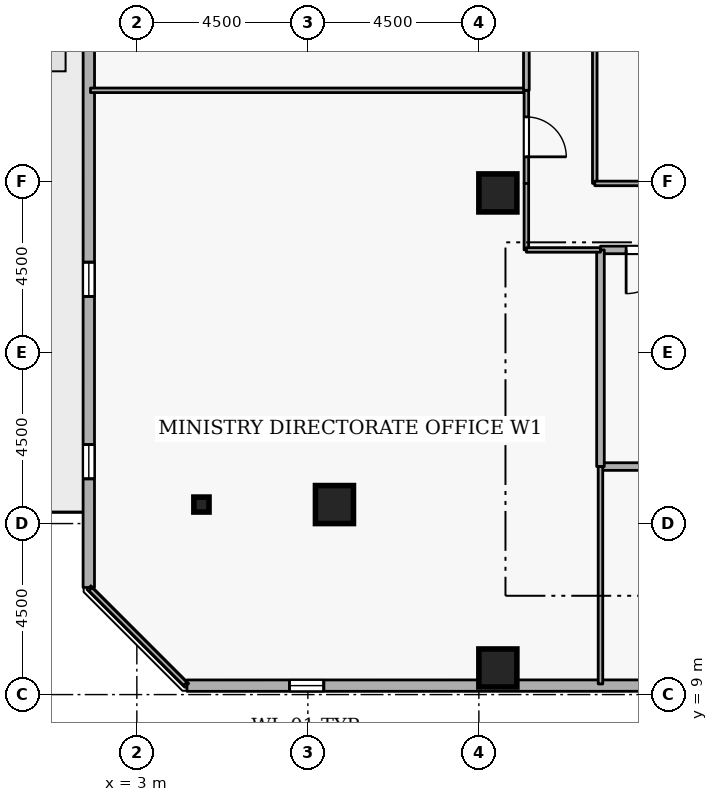
"""IFC4 building model, lengths in metres.
Left out: names, types, materials, properties, quantities, classifications, styles, units other than length and angle.
Written with IfcOpenShell. Run it as: python <this file> out.ifc"""

import sys

from ifc_helpers import new_model, si_unit, direction, frame, frame_2d, origin, origin_2d, place, context, subcontext, project, spatial, rectangle, i_section, extrude, element, fill, save


model = new_model("IFC4")
c1 = context("Model", 3, precision=1e-05, world=origin(), true_north=direction((0.0, 1.0)))
c2 = subcontext(c1, "Body", "Model", "MODEL_VIEW")
j1 = project(units=[si_unit("LENGTHUNIT", "METRE"), si_unit("PLANEANGLEUNIT", "RADIAN")], contexts=[c1])
p1 = place(None, origin())
s1 = spatial("IfcSite", under=j1, at=p1, CompositionType="ELEMENT")
p2 = place(p1, origin())
s2 = spatial("IfcBuilding", under=s1, at=p2, CompositionType="ELEMENT")
p3 = place(p2, frame((0.0, 0.0, 207.3)))
s3 = spatial("IfcBuildingStorey", under=s2, at=p3, CompositionType="ELEMENT", Elevation=207.3)
for number, where, z_axis, x_axis in (
    (1, (12.5, 9.7, 0.0), (0.0, 0.0, 1.0), (1.0, 0.0, 0.0)),
    (2, (8.2, 14.0, 0.0), (0.0, 0.0, 1.0), (1.0, 0.0, 0.0)),
    (3, (12.5, 22.2, 0.0), (0.0, 0.0, 1.0), (1.0, 0.0, 0.0)),
):
    element("IfcColumn", number, at=place(p3, frame(where, z_axis=z_axis, x_axis=x_axis)), inside=s3, PredefinedType="COLUMN", context=c2, shape_type="SweptSolid", body=[
        extrude(rectangle(XDim=1.0, YDim=1.0, at=origin_2d()), origin(), (0.0, 0.0, 1.0), 3.6),
    ])
p4 = place(p3, frame((4.7, 14.0, 0.0), z_axis=(0.0, 0.0, 1.0), x_axis=(1.0, 0.0, 0.0)))
e4 = element("IfcColumn", 4, at=p4, inside=s3, PredefinedType="COLUMN", context=c2, shape_type="SweptSolid", body=[
    extrude(i_section(OverallWidth=0.399, OverallDepth=0.394, WebThickness=0.023, FlangeThickness=0.037, FilletRadius=0.015, at=origin_2d()), origin(), (0.0, 0.0, 1.0), 3.6),
])
p5 = place(p3, frame((4.319, 9.235, 0.0), z_axis=(0.0, 0.0, 1.0), x_axis=(0.999999994606, 0.000103863011, 0.0)))
e5 = element("IfcWall", 5, at=p5, inside=s3, PredefinedType="STANDARD", context=c2, shape_type="SweptSolid", body=[
    extrude(rectangle(XDim=35.259, YDim=0.3, at=frame_2d((17.629, 0.0))), origin(), (0.0, 0.0, 1.0), 2.7),
])
p6 = place(p5, frame((2.7, 0.0, 0.72)))
e6 = element("IfcOpeningElement", 6, at=p6, cuts=e5, PredefinedType="OPENING", context=c2, shape_type="SweptSolid", body=[
    extrude(rectangle(XDim=0.9, YDim=1.75, at=frame_2d((0.45, 0.875))), frame((0.0, 0.16, 0.0), z_axis=(0.0, -1.0, 0.0), x_axis=(1.0, 0.0, 0.0)), (0.0, 0.0, 1.0), 0.32),
])
p7 = place(p5, frame((12.3, 0.0, 0.72)))
e7 = element("IfcOpeningElement", 7, at=p7, cuts=e5, PredefinedType="OPENING", context=c2, shape_type="SweptSolid", body=[
    extrude(rectangle(XDim=0.9, YDim=1.75, at=frame_2d((0.45, 0.875))), frame((0.0, 0.16, 0.0), z_axis=(0.0, -1.0, 0.0), x_axis=(1.0, 0.0, 0.0)), (0.0, 0.0, 1.0), 0.32),
])
p8 = place(p5, frame((17.1, 0.0, 0.72)))
e8 = element("IfcOpeningElement", 8, at=p8, cuts=e5, PredefinedType="OPENING", context=c2, shape_type="SweptSolid", body=[
    extrude(rectangle(XDim=0.9, YDim=1.75, at=frame_2d((0.45, 0.875))), frame((0.0, 0.16, 0.0), z_axis=(0.0, -1.0, 0.0), x_axis=(1.0, 0.0, 0.0)), (0.0, 0.0, 1.0), 0.32),
])
p9 = place(p5, frame((26.7, 0.0, 0.72)))
e9 = element("IfcOpeningElement", 9, at=p9, cuts=e5, PredefinedType="OPENING", context=c2, shape_type="SweptSolid", body=[
    extrude(rectangle(XDim=0.9, YDim=1.75, at=frame_2d((0.45, 0.875))), frame((0.0, 0.16, 0.0), z_axis=(0.0, -1.0, 0.0), x_axis=(1.0, 0.0, 0.0)), (0.0, 0.0, 1.0), 0.32),
])
p10 = place(p3, frame((1.739, 47.078, 0.0), z_axis=(0.0, 0.0, 1.0), x_axis=(-0.000103863011, -0.999999994606, 0.0)))
e10 = element("IfcWall", 10, at=p10, inside=s3, PredefinedType="STANDARD", context=c2, shape_type="SweptSolid", body=[
    extrude(rectangle(XDim=35.259, YDim=0.3, at=frame_2d((17.629, 0.0))), origin(), (0.0, 0.0, 1.0), 2.7),
])
p11 = place(p10, frame((19.43, 0.0, 0.0)))
e11 = element("IfcOpeningElement", 11, at=p11, cuts=e10, PredefinedType="OPENING", context=c2, shape_type="SweptSolid", body=[
    extrude(rectangle(XDim=1.0, YDim=2.08, at=frame_2d((0.5, 1.04))), frame((0.0, 0.16, 0.0), z_axis=(0.0, -1.0, 0.0), x_axis=(1.0, 0.0, 0.0)), (0.0, 0.0, 1.0), 0.32),
])
p12 = place(p10, frame((2.7, 0.0, 0.72)))
e12 = element("IfcOpeningElement", 12, at=p12, cuts=e10, PredefinedType="OPENING", context=c2, shape_type="SweptSolid", body=[
    extrude(rectangle(XDim=0.9, YDim=1.75, at=frame_2d((0.45, 0.875))), frame((0.0, 0.16, 0.0), z_axis=(0.0, -1.0, 0.0), x_axis=(1.0, 0.0, 0.0)), (0.0, 0.0, 1.0), 0.32),
])
p13 = place(p10, frame((7.5, 0.0, 0.72)))
e13 = element("IfcOpeningElement", 13, at=p13, cuts=e10, PredefinedType="OPENING", context=c2, shape_type="SweptSolid", body=[
    extrude(rectangle(XDim=0.9, YDim=1.75, at=frame_2d((0.45, 0.875))), frame((0.0, 0.16, 0.0), z_axis=(0.0, -1.0, 0.0), x_axis=(1.0, 0.0, 0.0)), (0.0, 0.0, 1.0), 0.32),
])
p14 = place(p10, frame((12.3, 0.0, 0.72)))
e14 = element("IfcOpeningElement", 14, at=p14, cuts=e10, PredefinedType="OPENING", context=c2, shape_type="SweptSolid", body=[
    extrude(rectangle(XDim=0.9, YDim=1.75, at=frame_2d((0.45, 0.875))), frame((0.0, 0.16, 0.0), z_axis=(0.0, -1.0, 0.0), x_axis=(1.0, 0.0, 0.0)), (0.0, 0.0, 1.0), 0.32),
])
p15 = place(p10, frame((26.7, 0.0, 0.72)))
e15 = element("IfcOpeningElement", 15, at=p15, cuts=e10, PredefinedType="OPENING", context=c2, shape_type="SweptSolid", body=[
    extrude(rectangle(XDim=0.9, YDim=1.75, at=frame_2d((0.45, 0.875))), frame((0.0, 0.16, 0.0), z_axis=(0.0, -1.0, 0.0), x_axis=(1.0, 0.0, 0.0)), (0.0, 0.0, 1.0), 0.32),
])
p16 = place(p10, frame((31.5, 0.0, 0.72)))
e16 = element("IfcOpeningElement", 16, at=p16, cuts=e10, PredefinedType="OPENING", context=c2, shape_type="SweptSolid", body=[
    extrude(rectangle(XDim=0.9, YDim=1.75, at=frame_2d((0.45, 0.875))), frame((0.0, 0.16, 0.0), z_axis=(0.0, -1.0, 0.0), x_axis=(1.0, 0.0, 0.0)), (0.0, 0.0, 1.0), 0.32),
])
p17 = place(p3, frame((15.2, 15.0, 0.0), z_axis=(0.0, 0.0, 1.0), x_axis=(1.0, 0.0, 0.0)))
e17 = element("IfcWall", 17, at=p17, inside=s3, PredefinedType="STANDARD", context=c2, shape_type="SweptSolid", body=[
    extrude(rectangle(XDim=2.5, YDim=0.2, at=frame_2d((1.25, 0.0))), origin(), (0.0, 0.0, 1.0), 3.34),
])
p18 = place(p3, frame((17.7, 20.7, 0.0), z_axis=(0.0, 0.0, 1.0), x_axis=(-1.0, 0.0, 0.0)))
e18 = element("IfcWall", 18, at=p18, inside=s3, PredefinedType="STANDARD", context=c2, shape_type="SweptSolid", body=[
    extrude(rectangle(XDim=2.5, YDim=0.2, at=frame_2d((1.25, 0.0))), origin(), (0.0, 0.0, 1.0), 3.34),
])
p19 = place(p18, frame((0.675, 0.0, 0.0)))
e19 = element("IfcOpeningElement", 19, at=p19, cuts=e18, PredefinedType="OPENING", context=c2, shape_type="SweptSolid", body=[
    extrude(rectangle(XDim=1.15, YDim=2.1, at=frame_2d((0.575, 1.05))), frame((0.0, 0.11, 0.0), z_axis=(0.0, -1.0, 0.0), x_axis=(1.0, 0.0, 0.0)), (0.0, 0.0, 1.0), 0.22),
])
p20 = place(p3, frame((15.2, 20.7, 0.0), z_axis=(0.0, 0.0, 1.0), x_axis=(0.0, -1.0, 0.0)))
e20 = element("IfcWall", 20, at=p20, inside=s3, PredefinedType="STANDARD", context=c2, shape_type="SweptSolid", body=[
    extrude(rectangle(XDim=5.7, YDim=0.2, at=frame_2d((2.85, 0.0))), origin(), (0.0, 0.0, 1.0), 3.34),
])
p21 = place(p3, frame((1.78, 24.9, 0.0), z_axis=(0.0, 0.0, 1.0), x_axis=(1.0, 0.0, 0.0)))
e21 = element("IfcWall", 21, at=p21, inside=s3, PredefinedType="PARTITIONING", context=c2, shape_type="SweptSolid", body=[
    extrude(rectangle(XDim=11.47, YDim=0.12, at=frame_2d((5.735, 0.0))), origin(), (0.0, 0.0, 1.0), 3.34),
])
p22 = place(p3, frame((13.25, 24.9, 0.0), z_axis=(0.0, 0.0, 1.0), x_axis=(0.0, -1.0, 0.0)))
e22 = element("IfcWall", 22, at=p22, inside=s3, PredefinedType="PARTITIONING", context=c2, shape_type="SweptSolid", body=[
    extrude(rectangle(XDim=2.45, YDim=0.12, at=frame_2d((1.225, 0.0))), origin(), (0.0, 0.0, 1.0), 3.34),
])
p23 = place(p22, frame((0.7, 0.0, 0.0)))
e23 = element("IfcOpeningElement", 23, at=p23, cuts=e22, PredefinedType="OPENING", context=c2, shape_type="SweptSolid", body=[
    extrude(rectangle(XDim=1.05, YDim=2.1, at=frame_2d((0.525, 1.05))), frame((0.0, 0.07, 0.0), z_axis=(0.0, -1.0, 0.0), x_axis=(1.0, 0.0, 0.0)), (0.0, 0.0, 1.0), 0.14),
])
p24 = place(p3, frame((13.25, 22.45, 0.0), z_axis=(0.0, 0.0, 1.0), x_axis=(0.0, -1.0, 0.0)))
e24 = element("IfcWall", 24, at=p24, inside=s3, PredefinedType="PARTITIONING", context=c2, shape_type="SweptSolid", body=[
    extrude(rectangle(XDim=1.75, YDim=0.12, at=frame_2d((0.875, 0.0))), origin(), (0.0, 0.0, 1.0), 3.34),
])
p25 = place(p3, frame((13.25, 20.7, 0.0), z_axis=(0.0, 0.0, 1.0), x_axis=(1.0, 0.0, 0.0)))
e25 = element("IfcWall", 25, at=p25, inside=s3, PredefinedType="PARTITIONING", context=c2, shape_type="SweptSolid", body=[
    extrude(rectangle(XDim=1.95, YDim=0.12, at=frame_2d((0.975, 0.0))), origin(), (0.0, 0.0, 1.0), 3.34),
])
p26 = place(p3, frame((15.2, 15.0, 0.0), z_axis=(0.0, 0.0, 1.0), x_axis=(0.0, -1.0, 0.0)))
e26 = element("IfcWall", 26, at=p26, inside=s3, PredefinedType="PARTITIONING", context=c2, shape_type="SweptSolid", body=[
    extrude(rectangle(XDim=5.72, YDim=0.12, at=frame_2d((2.86, 0.0))), origin(), (0.0, 0.0, 1.0), 3.34),
])
p27 = place(p3, frame((4.275, 9.28, 0.0), z_axis=(0.0, 0.0, 1.0), x_axis=(-0.707106781187, 0.707106781187, 0.0)))
e27 = element("IfcWall", 27, at=p27, inside=s3, PredefinedType="PARTITIONING", context=c2, shape_type="SweptSolid", body=[
    extrude(rectangle(XDim=3.528, YDim=0.12, at=frame_2d((1.764, 0.0))), origin(), (0.0, 0.0, 1.0), 3.34),
])
p28 = place(p3, frame((13.25, 29.1, 0.0), z_axis=(0.0, 0.0, 1.0), x_axis=(0.0, -1.0, 0.0)))
e28 = element("IfcWall", 28, at=p28, inside=s3, PredefinedType="PARTITIONING", context=c2, shape_type="SweptSolid", body=[
    extrude(rectangle(XDim=4.2, YDim=0.15, at=frame_2d((2.1, 0.0))), origin(), (0.0, 0.0, 1.0), 3.34),
])
p29 = place(p28, frame((1.45, 0.0, 0.0)))
e29 = element("IfcOpeningElement", 29, at=p29, cuts=e28, PredefinedType="OPENING", context=c2, shape_type="SweptSolid", body=[
    extrude(rectangle(XDim=1.3, YDim=2.12, at=frame_2d((0.65, 1.06))), frame((0.0, 0.085, 0.0), z_axis=(0.0, -1.0, 0.0), x_axis=(1.0, 0.0, 0.0)), (0.0, 0.0, 1.0), 0.17),
])
p30 = place(p3, frame((15.05, 22.45, 0.0), z_axis=(0.0, 0.0, 1.0), x_axis=(0.0, 1.0, 0.0)))
e30 = element("IfcWall", 30, at=p30, inside=s3, PredefinedType="PARTITIONING", context=c2, shape_type="SweptSolid", body=[
    extrude(rectangle(XDim=9.1, YDim=0.12, at=frame_2d((4.55, 0.0))), origin(), (0.0, 0.0, 1.0), 3.34),
])
p31 = place(p30, frame((4.075, 0.0, 0.0)))
e31 = element("IfcOpeningElement", 31, at=p31, cuts=e30, PredefinedType="OPENING", context=c2, shape_type="SweptSolid", body=[
    extrude(rectangle(XDim=0.95, YDim=2.1, at=frame_2d((0.475, 1.05))), frame((0.0, 0.07, 0.0), z_axis=(0.0, -1.0, 0.0), x_axis=(1.0, 0.0, 0.0)), (0.0, 0.0, 1.0), 0.14),
])
p32 = place(p3, frame((20.9, 22.45, 0.0), z_axis=(0.0, 0.0, 1.0), x_axis=(-1.0, 0.0, 0.0)))
e32 = element("IfcWall", 32, at=p32, inside=s3, PredefinedType="PARTITIONING", context=c2, shape_type="SweptSolid", body=[
    extrude(rectangle(XDim=5.85, YDim=0.12, at=frame_2d((2.925, 0.0))), origin(), (0.0, 0.0, 1.0), 3.34),
])
p33 = place(p6, origin())
e33 = element("IfcWindow", 33, at=p33, inside=s3, PartitioningType="SINGLE_PANEL", PredefinedType="WINDOW", context=c2, shape_type="SweptSolid", body=[
    extrude(rectangle(XDim=0.9, YDim=1.75, at=frame_2d((0.45, 0.875))), frame((0.0, 0.03, 0.0), z_axis=(0.0, -1.0, 0.0), x_axis=(1.0, 0.0, 0.0)), (0.0, 0.0, 1.0), 0.06),
])
fill(e6, e33)
p34 = place(p15, origin())
e34 = element("IfcWindow", 34, at=p34, inside=s3, PartitioningType="SINGLE_PANEL", PredefinedType="WINDOW", context=c2, shape_type="SweptSolid", body=[
    extrude(rectangle(XDim=0.9, YDim=1.75, at=frame_2d((0.45, 0.875))), frame((0.0, 0.03, 0.0), z_axis=(0.0, -1.0, 0.0), x_axis=(1.0, 0.0, 0.0)), (0.0, 0.0, 1.0), 0.06),
])
fill(e15, e34)
p35 = place(p16, origin())
e35 = element("IfcWindow", 35, at=p35, inside=s3, PartitioningType="SINGLE_PANEL", PredefinedType="WINDOW", context=c2, shape_type="SweptSolid", body=[
    extrude(rectangle(XDim=0.9, YDim=1.75, at=frame_2d((0.45, 0.875))), frame((0.0, 0.03, 0.0), z_axis=(0.0, -1.0, 0.0), x_axis=(1.0, 0.0, 0.0)), (0.0, 0.0, 1.0), 0.06),
])
fill(e16, e35)
p36 = place(p19, origin())
e36 = element("IfcDoor", 36, at=p36, inside=s3, OperationType="SINGLE_SWING_RIGHT", PredefinedType="DOOR", context=c2, shape_type="SweptSolid", body=[
    extrude(rectangle(XDim=1.15, YDim=2.1, at=frame_2d((0.575, 1.05))), frame((0.0, 0.025, 0.0), z_axis=(0.0, -1.0, 0.0), x_axis=(1.0, 0.0, 0.0)), (0.0, 0.0, 1.0), 0.05),
])
fill(e19, e36)
p37 = place(p23, origin())
e37 = element("IfcDoor", 37, at=p37, inside=s3, OperationType="SINGLE_SWING_RIGHT", PredefinedType="DOOR", context=c2, shape_type="SweptSolid", body=[
    extrude(rectangle(XDim=1.05, YDim=2.1, at=frame_2d((0.525, 1.05))), frame((0.0, 0.025, 0.0), z_axis=(0.0, -1.0, 0.0), x_axis=(1.0, 0.0, 0.0)), (0.0, 0.0, 1.0), 0.05),
])
fill(e23, e37)
save(model, sys.argv[1])
